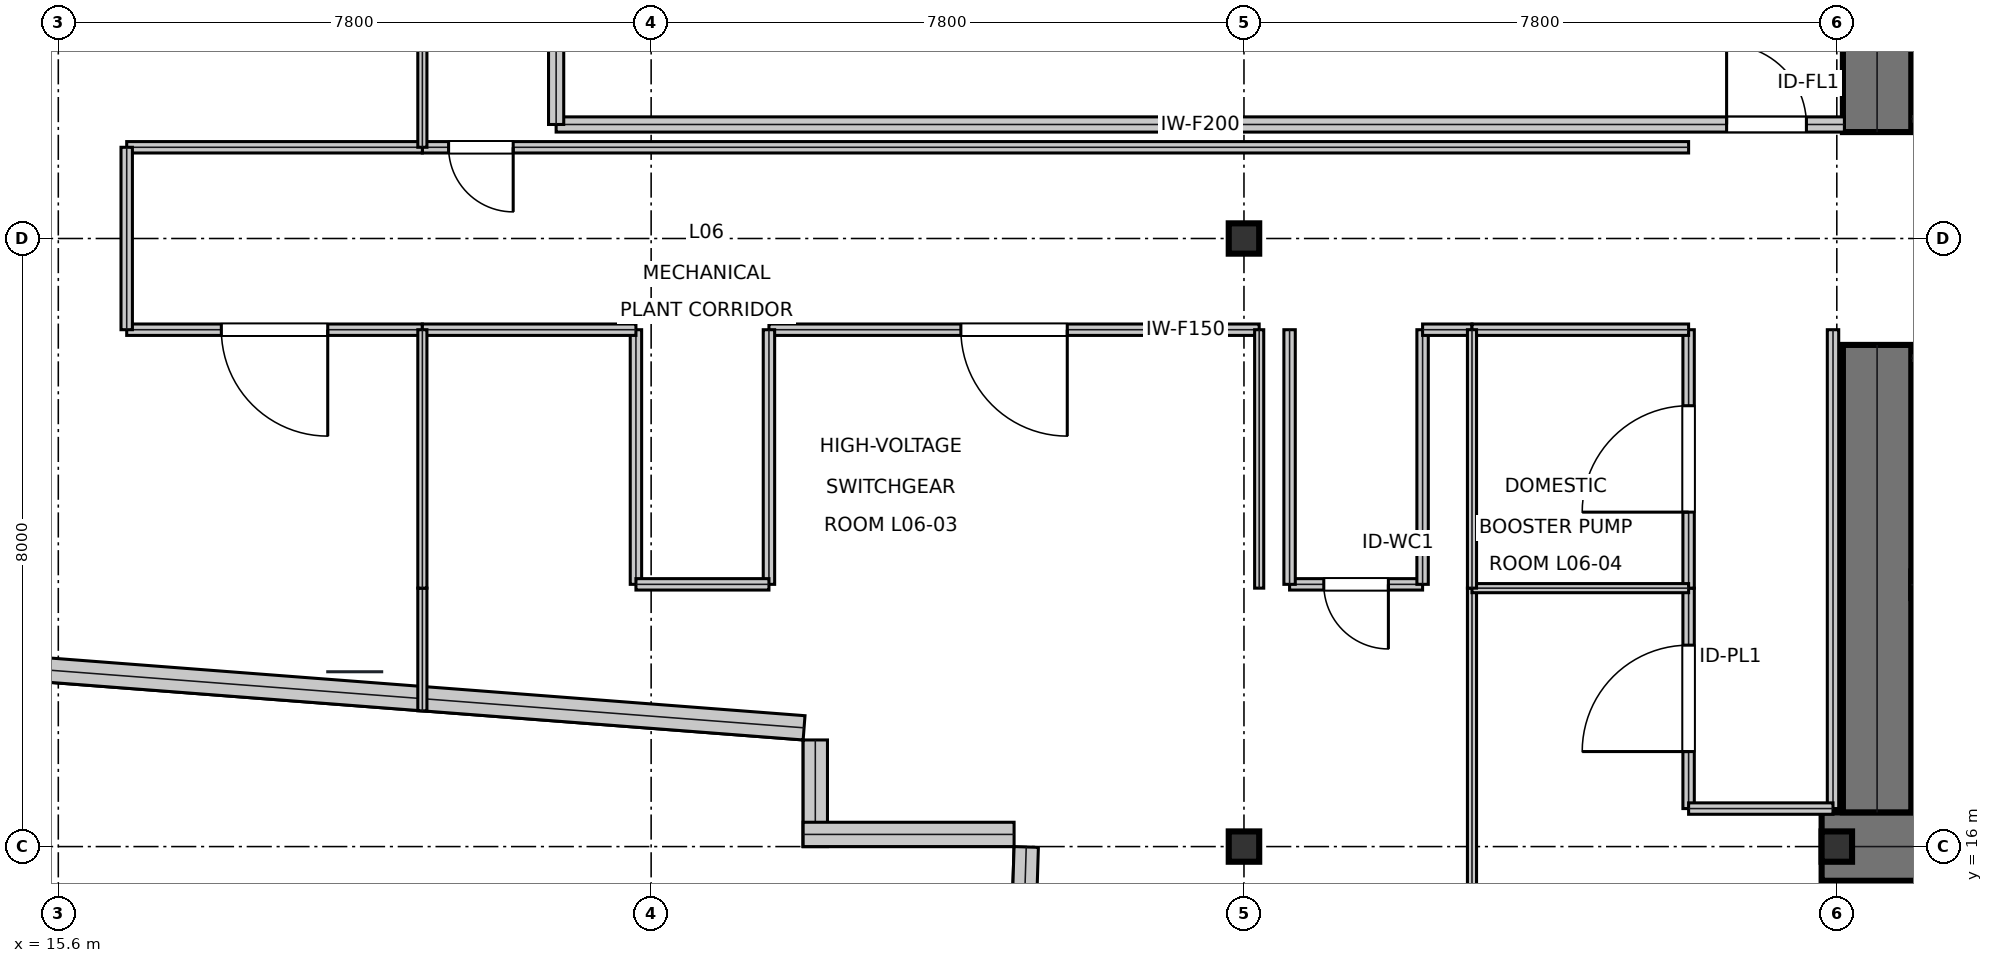
"""IFC4 building model, lengths in metres.
Left out: names, types, materials, properties, quantities, classifications, styles, units other than length and angle.
Written with IfcOpenShell. Run it as: python <this file> out.ifc"""

import sys

from ifc_helpers import new_model, si_unit, direction, frame, frame_2d, origin, origin_2d, place, context, subcontext, project, spatial, rectangle, i_section, extrude, element, fill, save


model = new_model("IFC4")
c1 = context("Model", 3, precision=1e-05, world=origin(), true_north=direction((0.0, 1.0)))
c2 = subcontext(c1, "Body", "Model", "MODEL_VIEW")
j1 = project(units=[si_unit("LENGTHUNIT", "METRE"), si_unit("PLANEANGLEUNIT", "RADIAN")], contexts=[c1])
p1 = place(None, origin())
s1 = spatial("IfcSite", under=j1, at=p1, CompositionType="ELEMENT")
p2 = place(p1, origin())
s2 = spatial("IfcBuilding", under=s1, at=p2, CompositionType="ELEMENT")
p3 = place(p2, frame((0.0, 0.0, 32.4)))
s3 = spatial("IfcBuildingStorey", under=s2, at=p3, CompositionType="ELEMENT", Elevation=32.4)
p4 = place(p3, frame((38.8, 16.0, 0.0), z_axis=(0.0, 0.0, 1.0), x_axis=(1.0, 0.0, 0.0)))
e1 = element("IfcWall", 1, at=p4, inside=s3, PredefinedType="SHEAR", context=c2, shape_type="SweptSolid", body=[
    extrude(rectangle(XDim=16.0, YDim=0.9, at=frame_2d((8.0, 0.0))), origin(), (0.0, 0.0, 1.0), 5.16),
])
p5 = place(p3, frame((39.53, 16.45, 0.0), z_axis=(0.0, 0.0, 1.0), x_axis=(0.0, 1.0, 0.0)))
e2 = element("IfcWall", 2, at=p5, inside=s3, PredefinedType="SHEAR", context=c2, shape_type="SweptSolid", body=[
    extrude(rectangle(XDim=6.15, YDim=0.9, at=frame_2d((3.075, 0.0))), origin(), (0.0, 0.0, 1.0), 5.16),
])
p6 = place(p3, frame((39.53, 25.4, 0.0), z_axis=(0.0, 0.0, 1.0), x_axis=(0.0, 1.0, 0.0)))
e3 = element("IfcWall", 3, at=p6, inside=s3, PredefinedType="SHEAR", context=c2, shape_type="SweptSolid", body=[
    extrude(rectangle(XDim=6.15, YDim=0.9, at=frame_2d((3.075, 0.0))), origin(), (0.0, 0.0, 1.0), 5.16),
])
p7 = place(p6, frame((1.35, 0.0, 0.0)))
e4 = element("IfcOpeningElement", 4, at=p7, cuts=e3, PredefinedType="OPENING", context=c2, shape_type="SweptSolid", body=[
    extrude(rectangle(XDim=1.05, YDim=2.15, at=frame_2d((0.525, 1.075))), frame((0.0, 0.46, 0.0), z_axis=(0.0, -1.0, 0.0), x_axis=(1.0, 0.0, 0.0)), (0.0, 0.0, 1.0), 0.92),
])
p8 = place(p3, frame((39.98, 19.445, 0.0), z_axis=(0.0, 0.0, 1.0), x_axis=(1.0, 0.0, 0.0)))
e5 = element("IfcWall", 5, at=p8, inside=s3, PredefinedType="SHEAR", context=c2, shape_type="SweptSolid", body=[
    extrude(rectangle(XDim=7.71, YDim=0.35, at=frame_2d((3.855, 0.0))), origin(), (0.0, 0.0, 1.0), 5.16),
])
p9 = place(p8, frame((0.25, 0.0, 0.0)))
e6 = element("IfcOpeningElement", 6, at=p9, cuts=e5, PredefinedType="OPENING", context=c2, shape_type="SweptSolid", body=[
    extrude(rectangle(XDim=1.1, YDim=2.15, at=frame_2d((0.55, 1.075))), frame((0.0, 0.185, 0.0), z_axis=(0.0, -1.0, 0.0), x_axis=(1.0, 0.0, 0.0)), (0.0, 0.0, 1.0), 0.37),
])
for number, where, z_axis, x_axis in (
    (7, (31.2, 16.0, 0.0), (0.0, 0.0, 1.0), (1.0, 0.0, 0.0)),
    (8, (31.2, 24.0, 0.0), (0.0, 0.0, 1.0), (1.0, 0.0, 0.0)),
    (9, (39.0, 16.0, 0.0), (0.0, 0.0, 1.0), (1.0, 0.0, 0.0)),
):
    element("IfcColumn", number, at=place(p3, frame(where, z_axis=z_axis, x_axis=x_axis)), inside=s3, PredefinedType="COLUMN", context=c2, shape_type="SweptSolid", body=[
        extrude(i_section(OverallWidth=0.401, OverallDepth=0.399, WebThickness=0.025, FlangeThickness=0.04, at=origin_2d()), origin(), (0.0, 0.0, 1.0), 5.394),
    ])
p10 = place(p3, frame((6.212, 19.03, 0.0), z_axis=(0.0, 0.0, 1.0), x_axis=(0.997092621347, -0.076199110592, 0.0)))
e10 = element("IfcWall", 10, at=p10, inside=s3, PredefinedType="STANDARD", context=c2, shape_type="SweptSolid", body=[
    extrude(rectangle(XDim=19.256, YDim=0.32, at=frame_2d((9.628, 0.0))), origin(), (0.0, 0.0, 1.0), 4.688),
])
p11 = place(p3, frame((25.56, 17.403, 0.0), z_axis=(0.0, 0.0, 1.0), x_axis=(0.0, -1.0, 0.0)))
e11 = element("IfcWall", 11, at=p11, inside=s3, PredefinedType="STANDARD", context=c2, shape_type="SweptSolid", body=[
    extrude(rectangle(XDim=1.403, YDim=0.32, at=frame_2d((0.701, 0.0))), origin(), (0.0, 0.0, 1.0), 4.688),
])
p12 = place(p3, frame((25.4, 16.16, 0.0), z_axis=(0.0, 0.0, 1.0), x_axis=(1.0, 0.0, 0.0)))
e12 = element("IfcWall", 12, at=p12, inside=s3, PredefinedType="STANDARD", context=c2, shape_type="SweptSolid", body=[
    extrude(rectangle(XDim=2.775, YDim=0.32, at=frame_2d((1.388, 0.0))), origin(), (0.0, 0.0, 1.0), 5.16),
])
p13 = place(p3, frame((28.335, 15.995, 0.0), z_axis=(0.0, 0.0, 1.0), x_axis=(-0.030865144105, -0.999523557941, 0.0)))
e13 = element("IfcWall", 13, at=p13, inside=s3, PredefinedType="STANDARD", context=c2, shape_type="SweptSolid", body=[
    extrude(rectangle(XDim=12.806, YDim=0.32, at=frame_2d((6.403, 0.0))), origin(), (0.0, 0.0, 1.0), 5.16),
])
p14 = place(p3, frame((39.98, 25.575, 0.0), z_axis=(0.0, 0.0, 1.0), x_axis=(1.0, 0.0, 0.0)))
e14 = element("IfcWall", 14, at=p14, inside=s3, PredefinedType="PARTITIONING", context=c2, shape_type="SweptSolid", body=[
    extrude(rectangle(XDim=5.9, YDim=0.15, at=frame_2d((2.95, 0.0))), origin(), (0.0, 0.0, 1.0), 5.16),
])
p15 = place(p14, frame((2.35, 0.0, 0.0)))
e15 = element("IfcOpeningElement", 15, at=p15, cuts=e14, PredefinedType="OPENING", context=c2, shape_type="SweptSolid", body=[
    extrude(rectangle(XDim=1.05, YDim=2.15, at=frame_2d((0.525, 1.075))), frame((0.0, 0.085, 0.0), z_axis=(0.0, -1.0, 0.0), x_axis=(1.0, 0.0, 0.0)), (0.0, 0.0, 1.0), 0.17),
])
p16 = place(p3, frame((39.98, 22.425, 0.0), z_axis=(0.0, 0.0, 1.0), x_axis=(1.0, 0.0, 0.0)))
e16 = element("IfcWall", 16, at=p16, inside=s3, PredefinedType="PARTITIONING", context=c2, shape_type="SweptSolid", body=[
    extrude(rectangle(XDim=5.9, YDim=0.15, at=frame_2d((2.95, 0.0))), origin(), (0.0, 0.0, 1.0), 5.16),
])
p17 = place(p16, frame((2.35, 0.0, 0.0)))
e17 = element("IfcOpeningElement", 17, at=p17, cuts=e16, PredefinedType="OPENING", context=c2, shape_type="SweptSolid", body=[
    extrude(rectangle(XDim=1.05, YDim=2.15, at=frame_2d((0.525, 1.075))), frame((0.0, 0.085, 0.0), z_axis=(0.0, -1.0, 0.0), x_axis=(1.0, 0.0, 0.0)), (0.0, 0.0, 1.0), 0.17),
])
p18 = place(p3, frame((22.15, 25.5, 0.0), z_axis=(0.0, 0.0, 1.0), x_axis=(1.0, 0.0, 0.0)))
e18 = element("IfcWall", 18, at=p18, inside=s3, PredefinedType="SOLIDWALL", context=c2, shape_type="SweptSolid", body=[
    extrude(rectangle(XDim=16.95, YDim=0.2, at=frame_2d((8.475, 0.0))), origin(), (0.0, 0.0, 1.0), 4.531),
])
p19 = place(p18, frame((15.4, 0.0, 0.0)))
e19 = element("IfcOpeningElement", 19, at=p19, cuts=e18, PredefinedType="OPENING", context=c2, shape_type="SweptSolid", body=[
    extrude(rectangle(XDim=1.05, YDim=2.15, at=frame_2d((0.525, 1.075))), frame((0.0, 0.11, 0.0), z_axis=(0.0, -1.0, 0.0), x_axis=(1.0, 0.0, 0.0)), (0.0, 0.0, 1.0), 0.22),
])
p20 = place(p3, frame((22.15, 25.5, 0.0), z_axis=(0.0, 0.0, 1.0), x_axis=(0.0, 1.0, 0.0)))
e20 = element("IfcWall", 20, at=p20, inside=s3, PredefinedType="SOLIDWALL", context=c2, shape_type="SweptSolid", body=[
    extrude(rectangle(XDim=4.709, YDim=0.2, at=frame_2d((2.354, 0.0))), origin(), (0.0, 0.0, 1.0), 4.688),
])
p21 = place(p3, frame((37.05, 16.5, 0.0), z_axis=(0.0, 0.0, 1.0), x_axis=(0.0, 1.0, 0.0)))
e21 = element("IfcWall", 21, at=p21, inside=s3, PredefinedType="PARTITIONING", context=c2, shape_type="SweptSolid", body=[
    extrude(rectangle(XDim=2.9, YDim=0.15, at=frame_2d((1.45, 0.0))), origin(), (0.0, 0.0, 1.0), 4.741),
])
p22 = place(p21, frame((0.75, 0.0, 0.0)))
e22 = element("IfcOpeningElement", 22, at=p22, cuts=e21, PredefinedType="OPENING", context=c2, shape_type="SweptSolid", body=[
    extrude(rectangle(XDim=1.4, YDim=2.2, at=frame_2d((0.7, 1.1))), frame((0.0, 0.085, 0.0), z_axis=(0.0, -1.0, 0.0), x_axis=(1.0, 0.0, 0.0)), (0.0, 0.0, 1.0), 0.17),
])
p23 = place(p3, frame((31.8, 19.45, 0.0), z_axis=(0.0, 0.0, 1.0), x_axis=(1.0, 0.0, 0.0)))
e23 = element("IfcWall", 23, at=p23, inside=s3, PredefinedType="PARTITIONING", context=c2, shape_type="SweptSolid", body=[
    extrude(rectangle(XDim=1.75, YDim=0.15, at=frame_2d((0.875, 0.0))), origin(), (0.0, 0.0, 1.0), 5.16),
])
p24 = place(p23, frame((0.45, 0.0, 0.0)))
e24 = element("IfcOpeningElement", 24, at=p24, cuts=e23, PredefinedType="OPENING", context=c2, shape_type="SweptSolid", body=[
    extrude(rectangle(XDim=0.85, YDim=2.15, at=frame_2d((0.425, 1.075))), frame((0.0, 0.085, 0.0), z_axis=(0.0, -1.0, 0.0), x_axis=(1.0, 0.0, 0.0)), (0.0, 0.0, 1.0), 0.17),
])
p25 = place(p3, frame((24.95, 22.8, 0.0), z_axis=(0.0, 0.0, 1.0), x_axis=(1.0, 0.0, 0.0)))
e25 = element("IfcWall", 25, at=p25, inside=s3, PredefinedType="PARTITIONING", context=c2, shape_type="SweptSolid", body=[
    extrude(rectangle(XDim=6.45, YDim=0.15, at=frame_2d((3.225, 0.0))), origin(), (0.0, 0.0, 1.0), 4.531),
])
p26 = place(p25, frame((2.525, 0.0, 0.0)))
e26 = element("IfcOpeningElement", 26, at=p26, cuts=e25, PredefinedType="OPENING", context=c2, shape_type="SweptSolid", body=[
    extrude(rectangle(XDim=1.4, YDim=2.2, at=frame_2d((0.7, 1.1))), frame((0.0, 0.085, 0.0), z_axis=(0.0, -1.0, 0.0), x_axis=(1.0, 0.0, 0.0)), (0.0, 0.0, 1.0), 0.17),
])
p27 = place(p3, frame((37.05, 19.4, 0.0), z_axis=(0.0, 0.0, 1.0), x_axis=(0.0, 1.0, 0.0)))
e27 = element("IfcWall", 27, at=p27, inside=s3, PredefinedType="PARTITIONING", context=c2, shape_type="SweptSolid", body=[
    extrude(rectangle(XDim=3.4, YDim=0.15, at=frame_2d((1.7, 0.0))), origin(), (0.0, 0.0, 1.0), 4.741),
])
p28 = place(p27, frame((1.0, 0.0, 0.0)))
e28 = element("IfcOpeningElement", 28, at=p28, cuts=e27, PredefinedType="OPENING", context=c2, shape_type="SweptSolid", body=[
    extrude(rectangle(XDim=1.4, YDim=2.2, at=frame_2d((0.7, 1.1))), frame((0.0, 0.085, 0.0), z_axis=(0.0, -1.0, 0.0), x_axis=(1.0, 0.0, 0.0)), (0.0, 0.0, 1.0), 0.17),
])
p29 = place(p3, frame((16.5, 22.8, 0.0), z_axis=(0.0, 0.0, 1.0), x_axis=(1.0, 0.0, 0.0)))
e29 = element("IfcWall", 29, at=p29, inside=s3, PredefinedType="PARTITIONING", context=c2, shape_type="SweptSolid", body=[
    extrude(rectangle(XDim=3.89, YDim=0.15, at=frame_2d((1.945, 0.0))), origin(), (0.0, 0.0, 1.0), 4.741),
])
p30 = place(p29, frame((1.245, 0.0, 0.0)))
e30 = element("IfcOpeningElement", 30, at=p30, cuts=e29, PredefinedType="OPENING", context=c2, shape_type="SweptSolid", body=[
    extrude(rectangle(XDim=1.4, YDim=2.2, at=frame_2d((0.7, 1.1))), frame((0.0, 0.085, 0.0), z_axis=(0.0, -1.0, 0.0), x_axis=(1.0, 0.0, 0.0)), (0.0, 0.0, 1.0), 0.17),
])
p31 = place(p3, frame((20.39, 25.2, 0.0), z_axis=(0.0, 0.0, 1.0), x_axis=(1.0, 0.0, 0.0)))
e31 = element("IfcWall", 31, at=p31, inside=s3, PredefinedType="PARTITIONING", context=c2, shape_type="SweptSolid", body=[
    extrude(rectangle(XDim=16.66, YDim=0.15, at=frame_2d((8.33, 0.0))), origin(), (0.0, 0.0, 1.0), 4.531),
])
p32 = place(p31, frame((0.345, 0.0, 0.0)))
e32 = element("IfcOpeningElement", 32, at=p32, cuts=e31, PredefinedType="OPENING", context=c2, shape_type="SweptSolid", body=[
    extrude(rectangle(XDim=0.85, YDim=2.15, at=frame_2d((0.425, 1.075))), frame((0.0, 0.085, 0.0), z_axis=(0.0, -1.0, 0.0), x_axis=(1.0, 0.0, 0.0)), (0.0, 0.0, 1.0), 0.17),
])
p33 = place(p3, frame((38.95, 16.5, 0.0), z_axis=(0.0, 0.0, 1.0), x_axis=(0.0, 1.0, 0.0)))
e33 = element("IfcWall", 33, at=p33, inside=s3, PredefinedType="PARTITIONING", context=c2, shape_type="SweptSolid", body=[
    extrude(rectangle(XDim=6.3, YDim=0.15, at=frame_2d((3.15, 0.0))), origin(), (0.0, 0.0, 1.0), 4.741),
])
p34 = place(p3, frame((37.05, 16.5, 0.0), z_axis=(0.0, 0.0, 1.0), x_axis=(1.0, 0.0, 0.0)))
e34 = element("IfcWall", 34, at=p34, inside=s3, PredefinedType="PARTITIONING", context=c2, shape_type="SweptSolid", body=[
    extrude(rectangle(XDim=1.9, YDim=0.15, at=frame_2d((0.95, 0.0))), origin(), (0.0, 0.0, 1.0), 5.16),
])
for number, where, z_axis, x_axis in (
    (35, (33.55, 19.45, 0.0), (0.0, 0.0, 1.0), (0.0, 1.0, 0.0)),
    (36, (31.8, 19.45, 0.0), (0.0, 0.0, 1.0), (0.0, 1.0, 0.0)),
):
    element("IfcWall", number, at=place(p3, frame(where, z_axis=z_axis, x_axis=x_axis)), inside=s3, PredefinedType="PARTITIONING", context=c2, shape_type="SweptSolid", body=[
        extrude(rectangle(XDim=3.35, YDim=0.15, at=frame_2d((1.675, 0.0))), origin(), (0.0, 0.0, 1.0), 4.741),
    ])
p35 = place(p3, frame((33.55, 22.8, 0.0), z_axis=(0.0, 0.0, 1.0), x_axis=(1.0, 0.0, 0.0)))
e37 = element("IfcWall", 37, at=p35, inside=s3, PredefinedType="PARTITIONING", context=c2, shape_type="SweptSolid", body=[
    extrude(rectangle(XDim=0.65, YDim=0.15, at=frame_2d((0.325, 0.0))), origin(), (0.0, 0.0, 1.0), 5.16),
])
for number, where, z_axis, x_axis in (
    (38, (24.95, 19.45, 0.0), (0.0, 0.0, 1.0), (0.0, 1.0, 0.0)),
    (39, (23.2, 19.45, 0.0), (0.0, 0.0, 1.0), (0.0, 1.0, 0.0)),
):
    element("IfcWall", number, at=place(p3, frame(where, z_axis=z_axis, x_axis=x_axis)), inside=s3, PredefinedType="PARTITIONING", context=c2, shape_type="SweptSolid", body=[
        extrude(rectangle(XDim=3.35, YDim=0.15, at=frame_2d((1.675, 0.0))), origin(), (0.0, 0.0, 1.0), 5.16),
    ])
p36 = place(p3, frame((20.39, 22.8, 0.0), z_axis=(0.0, 0.0, 1.0), x_axis=(1.0, 0.0, 0.0)))
e40 = element("IfcWall", 40, at=p36, inside=s3, PredefinedType="PARTITIONING", context=c2, shape_type="SweptSolid", body=[
    extrude(rectangle(XDim=2.81, YDim=0.15, at=frame_2d((1.405, 0.0))), origin(), (0.0, 0.0, 1.0), 4.531),
])
p37 = place(p3, frame((23.2, 19.45, 0.0), z_axis=(0.0, 0.0, 1.0), x_axis=(1.0, 0.0, 0.0)))
e41 = element("IfcWall", 41, at=p37, inside=s3, PredefinedType="PARTITIONING", context=c2, shape_type="SweptSolid", body=[
    extrude(rectangle(XDim=1.75, YDim=0.15, at=frame_2d((0.875, 0.0))), origin(), (0.0, 0.0, 1.0), 5.16),
])
p38 = place(p3, frame((34.2, 22.8, 0.0), z_axis=(0.0, 0.0, 1.0), x_axis=(1.0, 0.0, 0.0)))
e42 = element("IfcWall", 42, at=p38, inside=s3, PredefinedType="PARTITIONING", context=c2, shape_type="SweptSolid", body=[
    extrude(rectangle(XDim=2.85, YDim=0.15, at=frame_2d((1.425, 0.0))), origin(), (0.0, 0.0, 1.0), 5.16),
])
p39 = place(p3, frame((16.5, 25.2, 0.0), z_axis=(0.0, 0.0, 1.0), x_axis=(1.0, 0.0, 0.0)))
e43 = element("IfcWall", 43, at=p39, inside=s3, PredefinedType="PARTITIONING", context=c2, shape_type="SweptSolid", body=[
    extrude(rectangle(XDim=3.89, YDim=0.15, at=frame_2d((1.945, 0.0))), origin(), (0.0, 0.0, 1.0), 4.741),
])
p40 = place(p3, frame((16.5, 22.8, 0.0), z_axis=(0.0, 0.0, 1.0), x_axis=(0.0, 1.0, 0.0)))
e44 = element("IfcWall", 44, at=p40, inside=s3, PredefinedType="PARTITIONING", context=c2, shape_type="SweptSolid", body=[
    extrude(rectangle(XDim=2.4, YDim=0.15, at=frame_2d((1.2, 0.0))), origin(), (0.0, 0.0, 1.0), 5.16),
])
p41 = place(p3, frame((34.2, 1.371, 0.0), z_axis=(0.0, 0.0, 1.0), x_axis=(0.0, 1.0, 0.0)))
e45 = element("IfcWall", 45, at=p41, inside=s3, PredefinedType="PARTITIONING", context=c2, shape_type="SweptSolid", body=[
    extrude(rectangle(XDim=18.029, YDim=0.12, at=frame_2d((9.015, 0.0))), origin(), (0.0, 0.0, 1.0), 4.531),
])
p42 = place(p3, frame((34.2, 19.4, 0.0), z_axis=(0.0, 0.0, 1.0), x_axis=(1.0, 0.0, 0.0)))
e46 = element("IfcWall", 46, at=p42, inside=s3, PredefinedType="PARTITIONING", context=c2, shape_type="SweptSolid", body=[
    extrude(rectangle(XDim=2.85, YDim=0.12, at=frame_2d((1.425, 0.0))), origin(), (0.0, 0.0, 1.0), 5.16),
])
p43 = place(p3, frame((31.4, 19.4, 0.0), z_axis=(0.0, 0.0, 1.0), x_axis=(0.0, 1.0, 0.0)))
e47 = element("IfcWall", 47, at=p43, inside=s3, PredefinedType="PARTITIONING", context=c2, shape_type="SweptSolid", body=[
    extrude(rectangle(XDim=3.4, YDim=0.12, at=frame_2d((1.7, 0.0))), origin(), (0.0, 0.0, 1.0), 4.531),
])
p44 = place(p3, frame((34.2, 19.4, 0.0), z_axis=(0.0, 0.0, 1.0), x_axis=(0.0, 1.0, 0.0)))
e48 = element("IfcWall", 48, at=p44, inside=s3, PredefinedType="PARTITIONING", context=c2, shape_type="SweptSolid", body=[
    extrude(rectangle(XDim=3.4, YDim=0.12, at=frame_2d((1.7, 0.0))), origin(), (0.0, 0.0, 1.0), 4.741),
])
p45 = place(p3, frame((20.39, 17.786, 0.0), z_axis=(0.0, 0.0, 1.0), x_axis=(0.0, 1.0, 0.0)))
e49 = element("IfcWall", 49, at=p45, inside=s3, PredefinedType="PARTITIONING", context=c2, shape_type="SweptSolid", body=[
    extrude(rectangle(XDim=1.614, YDim=0.12, at=frame_2d((0.807, 0.0))), origin(), (0.0, 0.0, 1.0), 4.688),
])
p46 = place(p3, frame((20.39, 19.4, 0.0), z_axis=(0.0, 0.0, 1.0), x_axis=(0.0, 1.0, 0.0)))
e50 = element("IfcWall", 50, at=p46, inside=s3, PredefinedType="PARTITIONING", context=c2, shape_type="SweptSolid", body=[
    extrude(rectangle(XDim=3.4, YDim=0.12, at=frame_2d((1.7, 0.0))), origin(), (0.0, 0.0, 1.0), 4.531),
])
p47 = place(p3, frame((20.39, 25.2, 0.0), z_axis=(0.0, 0.0, 1.0), x_axis=(0.0, 1.0, 0.0)))
e51 = element("IfcWall", 51, at=p47, inside=s3, PredefinedType="PARTITIONING", context=c2, shape_type="SweptSolid", body=[
    extrude(rectangle(XDim=5.014, YDim=0.12, at=frame_2d((2.507, 0.0))), origin(), (0.0, 0.0, 1.0), 4.531),
])
p48 = place(p19, origin())
e52 = element("IfcDoor", 52, at=p48, inside=s3, OperationType="SINGLE_SWING_LEFT", PredefinedType="DOOR", context=c2, shape_type="SweptSolid", body=[
    extrude(rectangle(XDim=1.05, YDim=2.15, at=frame_2d((0.525, 1.075))), frame((0.0, 0.025, 0.0), z_axis=(0.0, -1.0, 0.0), x_axis=(1.0, 0.0, 0.0)), (0.0, 0.0, 1.0), 0.05),
])
fill(e19, e52)
p49 = place(p22, origin())
e53 = element("IfcDoor", 53, at=p49, inside=s3, OperationType="SINGLE_SWING_LEFT", PredefinedType="DOOR", context=c2, shape_type="SweptSolid", body=[
    extrude(rectangle(XDim=1.4, YDim=2.2, at=frame_2d((0.7, 1.1))), frame((0.0, 0.025, 0.0), z_axis=(0.0, -1.0, 0.0), x_axis=(1.0, 0.0, 0.0)), (0.0, 0.0, 1.0), 0.05),
])
fill(e22, e53)
p50 = place(p24, frame((0.85, 0.0, 0.0), z_axis=(0.0, 0.0, 1.0), x_axis=(-1.0, 0.0, 0.0)))
e54 = element("IfcDoor", 54, at=p50, inside=s3, OperationType="SINGLE_SWING_LEFT", PredefinedType="DOOR", context=c2, shape_type="SweptSolid", body=[
    extrude(rectangle(XDim=0.85, YDim=2.15, at=frame_2d((0.425, 1.075))), frame((0.0, 0.025, 0.0), z_axis=(0.0, -1.0, 0.0), x_axis=(1.0, 0.0, 0.0)), (0.0, 0.0, 1.0), 0.05),
])
fill(e24, e54)
p51 = place(p26, frame((1.4, 0.0, 0.0), z_axis=(0.0, 0.0, 1.0), x_axis=(-1.0, 0.0, 0.0)))
e55 = element("IfcDoor", 55, at=p51, inside=s3, OperationType="SINGLE_SWING_LEFT", PredefinedType="DOOR", context=c2, shape_type="SweptSolid", body=[
    extrude(rectangle(XDim=1.4, YDim=2.2, at=frame_2d((0.7, 1.1))), frame((0.0, 0.025, 0.0), z_axis=(0.0, -1.0, 0.0), x_axis=(1.0, 0.0, 0.0)), (0.0, 0.0, 1.0), 0.05),
])
fill(e26, e55)
p52 = place(p28, origin())
e56 = element("IfcDoor", 56, at=p52, inside=s3, OperationType="SINGLE_SWING_LEFT", PredefinedType="DOOR", context=c2, shape_type="SweptSolid", body=[
    extrude(rectangle(XDim=1.4, YDim=2.2, at=frame_2d((0.7, 1.1))), frame((0.0, 0.025, 0.0), z_axis=(0.0, -1.0, 0.0), x_axis=(1.0, 0.0, 0.0)), (0.0, 0.0, 1.0), 0.05),
])
fill(e28, e56)
p53 = place(p30, frame((1.4, 0.0, 0.0), z_axis=(0.0, 0.0, 1.0), x_axis=(-1.0, 0.0, 0.0)))
e57 = element("IfcDoor", 57, at=p53, inside=s3, OperationType="SINGLE_SWING_LEFT", PredefinedType="DOOR", context=c2, shape_type="SweptSolid", body=[
    extrude(rectangle(XDim=1.4, YDim=2.2, at=frame_2d((0.7, 1.1))), frame((0.0, 0.025, 0.0), z_axis=(0.0, -1.0, 0.0), x_axis=(1.0, 0.0, 0.0)), (0.0, 0.0, 1.0), 0.05),
])
fill(e30, e57)
p54 = place(p32, frame((0.85, 0.0, 0.0), z_axis=(0.0, 0.0, 1.0), x_axis=(-1.0, 0.0, 0.0)))
e58 = element("IfcDoor", 58, at=p54, inside=s3, OperationType="SINGLE_SWING_LEFT", PredefinedType="DOOR", context=c2, shape_type="SweptSolid", body=[
    extrude(rectangle(XDim=0.85, YDim=2.15, at=frame_2d((0.425, 1.075))), frame((0.0, 0.025, 0.0), z_axis=(0.0, -1.0, 0.0), x_axis=(1.0, 0.0, 0.0)), (0.0, 0.0, 1.0), 0.05),
])
fill(e32, e58)
save(model, sys.argv[1])
